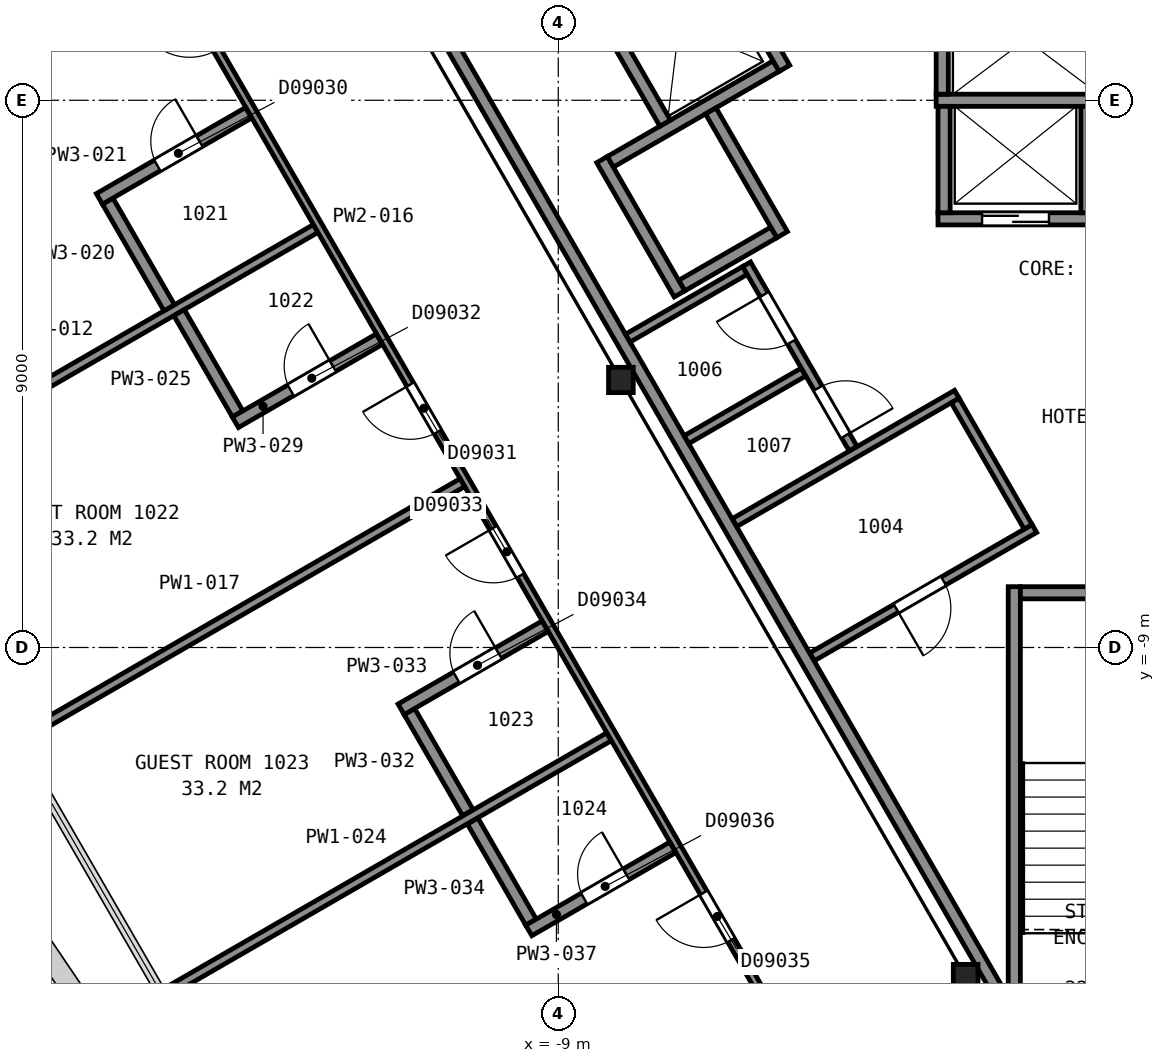
"""IFC4 building model, lengths in metres.
Left out: names, types, materials, properties, quantities, classifications, styles, units other than length and angle.
Written with IfcOpenShell. Run it as: python <this file> out.ifc"""

import sys

from ifc_helpers import new_model, si_unit, direction, frame, frame_2d, origin, origin_2d, place, context, subcontext, project, spatial, rectangle, i_section, extrude, element, fill, save


model = new_model("IFC4")
c1 = context("Model", 3, precision=1e-05, world=origin(), true_north=direction((0.0, 1.0)))
c2 = subcontext(c1, "Body", "Model", "MODEL_VIEW")
j1 = project(units=[si_unit("LENGTHUNIT", "METRE"), si_unit("PLANEANGLEUNIT", "RADIAN")], contexts=[c1])
p1 = place(None, origin())
s1 = spatial("IfcSite", under=j1, at=p1, CompositionType="ELEMENT")
p2 = place(p1, origin())
s2 = spatial("IfcBuilding", under=s1, at=p2, CompositionType="ELEMENT")
p3 = place(p2, frame((0.0, 0.0, 51.2)))
s3 = spatial("IfcBuildingStorey", under=s2, at=p3, CompositionType="ELEMENT", Elevation=51.2)
for number, where, z_axis, x_axis in (
    (1, (-7.97, -4.6, 0.0), (0.0, 0.0, 1.0), (1.0, 0.0, 0.0)),
    (2, (-2.3, -14.42, 0.0), (0.0, 0.0, 1.0), (1.0, 0.0, 0.0)),
):
    element("IfcColumn", number, at=place(p3, frame(where, z_axis=z_axis, x_axis=x_axis)), inside=s3, PredefinedType="COLUMN", context=c2, shape_type="SweptSolid", body=[
        extrude(i_section(OverallWidth=0.406, OverallDepth=0.417, WebThickness=0.03, FlangeThickness=0.048, FilletRadius=0.015, at=origin_2d()), origin(), (0.0, 0.0, 1.0), 3.6),
    ])
p4 = place(p3, frame((-1.5, -8.0, 0.0), z_axis=(0.0, 0.0, 1.0), x_axis=(0.0, -1.0, 0.0)))
e3 = element("IfcWall", 3, at=p4, inside=s3, PredefinedType="PARTITIONING", context=c2, shape_type="SweptSolid", body=[
    extrude(rectangle(XDim=12.0, YDim=0.2, at=frame_2d((6.0, 0.0))), origin(), (0.0, 0.0, 1.0), 3.35),
])
p5 = place(p3, frame((-1.4, -8.1, 0.0), z_axis=(0.0, 0.0, 1.0), x_axis=(1.0, 0.0, 0.0)))
e4 = element("IfcWall", 4, at=p5, inside=s3, PredefinedType="PARTITIONING", context=c2, shape_type="SweptSolid", body=[
    extrude(rectangle(XDim=2.8, YDim=0.2, at=frame_2d((1.4, 0.0))), origin(), (0.0, 0.0, 1.0), 3.35),
])
p6 = place(p3, frame((-2.755, -1.95, 0.0), z_axis=(0.0, 0.0, 1.0), x_axis=(1.0, 0.0, 0.0)))
e5 = element("IfcWall", 5, at=p6, inside=s3, PredefinedType="PARTITIONING", context=c2, shape_type="SweptSolid", body=[
    extrude(rectangle(XDim=2.55, YDim=0.2, at=frame_2d((1.275, 0.0))), origin(), (0.0, 0.0, 1.0), 3.6),
])
p7 = place(p6, frame((0.725, 0.0, 0.0)))
e6 = element("IfcOpeningElement", 6, at=p7, cuts=e5, PredefinedType="OPENING", context=c2, shape_type="SweptSolid", body=[
    extrude(rectangle(XDim=1.1, YDim=2.1, at=frame_2d((0.55, 1.05))), frame((0.0, 0.11, 0.0), z_axis=(0.0, -1.0, 0.0), x_axis=(1.0, 0.0, 0.0)), (0.0, 0.0, 1.0), 0.22),
])
p8 = place(p3, frame((-2.785, 0.0, 0.0), z_axis=(0.0, 0.0, 1.0), x_axis=(1.0, 0.0, 0.0)))
e7 = element("IfcWall", 7, at=p8, inside=s3, PredefinedType="PARTITIONING", context=c2, shape_type="SweptSolid", body=[
    extrude(rectangle(XDim=2.95, YDim=0.2, at=frame_2d((1.475, 0.0))), origin(), (0.0, 0.0, 1.0), 3.6),
])
p9 = place(p3, frame((-6.97, -3.048, 0.0), z_axis=(0.0, 0.0, 1.0), x_axis=(0.866036909293, 0.499980071345, 0.0)))
e8 = element("IfcWall", 8, at=p9, inside=s3, PredefinedType="PARTITIONING", context=c2, shape_type="SweptSolid", body=[
    extrude(rectangle(XDim=1.75, YDim=0.2, at=frame_2d((0.875, 0.0))), origin(), (0.0, 0.0, 1.0), 3.6),
])
p10 = place(p3, frame((-8.145, -1.013, 0.0), z_axis=(0.0, 0.0, 1.0), x_axis=(0.866016494683, 0.500015430699, 0.0)))
e9 = element("IfcWall", 9, at=p10, inside=s3, PredefinedType="PARTITIONING", context=c2, shape_type="SweptSolid", body=[
    extrude(rectangle(XDim=3.15, YDim=0.2, at=frame_2d((1.575, 0.0))), origin(), (0.0, 0.0, 1.0), 3.6),
])
for number, where, z_axis, x_axis in (
    (10, (-0.305, -1.85, 0.0), (0.0, 0.0, 1.0), (0.0, 1.0, 0.0)),
    (11, (-2.655, -1.85, 0.0), (0.0, 0.0, 1.0), (0.0, 1.0, 0.0)),
):
    element("IfcWall", number, at=place(p3, frame(where, z_axis=z_axis, x_axis=x_axis)), inside=s3, PredefinedType="PARTITIONING", context=c2, shape_type="SweptSolid", body=[
        extrude(rectangle(XDim=1.75, YDim=0.2, at=frame_2d((0.875, 0.0))), origin(), (0.0, 0.0, 1.0), 3.6),
    ])
p11 = place(p3, frame((-2.685, 0.1, 0.0), z_axis=(0.0, 0.0, 1.0), x_axis=(0.0, 1.0, 0.0)))
e12 = element("IfcWall", 12, at=p11, inside=s3, PredefinedType="PARTITIONING", context=c2, shape_type="SweptSolid", body=[
    extrude(rectangle(XDim=1.95, YDim=0.2, at=frame_2d((0.975, 0.0))), origin(), (0.0, 0.0, 1.0), 3.6),
])
p12 = place(p3, frame((-5.28, 0.525, 0.0), z_axis=(0.0, 0.0, 1.0), x_axis=(-0.500037662692, 0.866003658127, 0.0)))
e13 = element("IfcWall", 13, at=p12, inside=s3, PredefinedType="PARTITIONING", context=c2, shape_type="SweptSolid", body=[
    extrude(rectangle(XDim=2.95, YDim=0.2, at=frame_2d((1.475, 0.0))), origin(), (0.0, 0.0, 1.0), 3.6),
])
p13 = place(p12, frame((0.925, 0.0, 0.0)))
e14 = element("IfcOpeningElement", 14, at=p13, cuts=e13, PredefinedType="OPENING", context=c2, shape_type="SweptSolid", body=[
    extrude(rectangle(XDim=1.1, YDim=2.1, at=frame_2d((0.55, 1.05))), frame((0.0, 0.11, 0.0), z_axis=(0.0, -1.0, 0.0), x_axis=(1.0, 0.0, 0.0)), (0.0, 0.0, 1.0), 0.22),
])
p14 = place(p3, frame((-5.318, -2.21, 0.0), z_axis=(0.0, 0.0, 1.0), x_axis=(-0.499938297808, 0.866061024631, 0.0)))
e15 = element("IfcWall", 15, at=p14, inside=s3, PredefinedType="PARTITIONING", context=c2, shape_type="SweptSolid", body=[
    extrude(rectangle(XDim=2.35, YDim=0.2, at=frame_2d((1.175, 0.0))), origin(), (0.0, 0.0, 1.0), 3.6),
])
p15 = place(p3, frame((-7.242, -0.376, 0.0), z_axis=(0.0, 0.0, 1.0), x_axis=(-0.499996545922, 0.866027397988, 0.0)))
e16 = element("IfcWall", 16, at=p15, inside=s3, PredefinedType="PARTITIONING", context=c2, shape_type="SweptSolid", body=[
    extrude(rectangle(XDim=2.75, YDim=0.2, at=frame_2d((1.375, 0.0))), origin(), (0.0, 0.0, 1.0), 3.6),
])
p16 = place(p3, frame((-7.006, -3.185, 0.0), z_axis=(0.0, 0.0, 1.0), x_axis=(-0.499990435942, 0.866030925526, 0.0)))
e17 = element("IfcWall", 17, at=p16, inside=s3, PredefinedType="PARTITIONING", context=c2, shape_type="SweptSolid", body=[
    extrude(rectangle(XDim=2.55, YDim=0.2, at=frame_2d((1.275, 0.0))), origin(), (0.0, 0.0, 1.0), 3.6),
])
p17 = place(p3, frame((-13.664, 5.946, 0.0), z_axis=(0.0, 0.0, 1.0), x_axis=(0.499994327219, -0.866028678941, 0.0)))
e18 = element("IfcWall", 18, at=p17, inside=s3, PredefinedType="PARTITIONING", context=c2, shape_type="SweptSolid", body=[
    extrude(rectangle(XDim=23.968, YDim=0.2, at=frame_2d((11.984, 0.0))), origin(), (0.0, 0.0, 1.0), 3.35),
])
p18 = place(p3, frame((-7.856, -3.912, 0.0), z_axis=(0.0, 0.0, 1.0), x_axis=(0.865971748, 0.500092923031, 0.0)))
e19 = element("IfcWall", 19, at=p18, inside=s3, PredefinedType="PARTITIONING", context=c2, shape_type="SweptSolid", body=[
    extrude(rectangle(XDim=2.225, YDim=0.15, at=frame_2d((1.112, 0.0))), origin(), (0.0, 0.0, 1.0), 3.35),
])
p19 = place(p3, frame((-6.892, -5.582, 0.0), z_axis=(0.0, 0.0, 1.0), x_axis=(0.865944298464, 0.500140452231, 0.0)))
e20 = element("IfcWall", 20, at=p19, inside=s3, PredefinedType="PARTITIONING", context=c2, shape_type="SweptSolid", body=[
    extrude(rectangle(XDim=2.224, YDim=0.15, at=frame_2d((1.112, 0.0))), origin(), (0.0, 0.0, 1.0), 3.35),
])
p20 = place(p3, frame((-6.1, -6.946, 0.0), z_axis=(0.0, 0.0, 1.0), x_axis=(0.866038200431, 0.499977834903, 0.0)))
e21 = element("IfcWall", 21, at=p20, inside=s3, PredefinedType="PARTITIONING", context=c2, shape_type="SweptSolid", body=[
    extrude(rectangle(XDim=4.22, YDim=0.15, at=frame_2d((2.11, 0.0))), origin(), (0.0, 0.0, 1.0), 3.35),
])
p21 = place(p3, frame((-4.152, -5.729, 0.0), z_axis=(0.0, 0.0, 1.0), x_axis=(-0.500024287448, 0.866011380966, 0.0)))
e22 = element("IfcWall", 22, at=p21, inside=s3, PredefinedType="PARTITIONING", context=c2, shape_type="SweptSolid", body=[
    extrude(rectangle(XDim=3.501, YDim=0.15, at=frame_2d((1.75, 0.0))), origin(), (0.0, 0.0, 1.0), 3.35),
])
p22 = place(p21, frame((2.026, 0.0, 0.0)))
e23 = element("IfcOpeningElement", 23, at=p22, cuts=e22, PredefinedType="OPENING", context=c2, shape_type="SweptSolid", body=[
    extrude(rectangle(XDim=0.9, YDim=2.1, at=frame_2d((0.45, 1.05))), frame((0.0, 0.085, 0.0), z_axis=(0.0, -1.0, 0.0), x_axis=(1.0, 0.0, 0.0)), (0.0, 0.0, 1.0), 0.17),
])
p23 = place(p21, frame((0.248, 0.0, 0.0)))
e24 = element("IfcOpeningElement", 24, at=p23, cuts=e22, PredefinedType="OPENING", context=c2, shape_type="SweptSolid", body=[
    extrude(rectangle(XDim=0.9, YDim=2.1, at=frame_2d((0.45, 1.05))), frame((0.0, 0.085, 0.0), z_axis=(0.0, -1.0, 0.0), x_axis=(1.0, 0.0, 0.0)), (0.0, 0.0, 1.0), 0.17),
])
p24 = place(p3, frame((-4.825, -9.154, 0.0), z_axis=(0.0, 0.0, 1.0), x_axis=(0.866023738697, 0.500002884005, 0.0)))
e25 = element("IfcWall", 25, at=p24, inside=s3, PredefinedType="PARTITIONING", context=c2, shape_type="SweptSolid", body=[
    extrude(rectangle(XDim=4.22, YDim=0.15, at=frame_2d((2.11, 0.0))), origin(), (0.0, 0.0, 1.0), 3.35),
])
p25 = place(p24, frame((1.595, 0.0, 0.0)))
e26 = element("IfcOpeningElement", 26, at=p25, cuts=e25, PredefinedType="OPENING", context=c2, shape_type="SweptSolid", body=[
    extrude(rectangle(XDim=0.9, YDim=2.1, at=frame_2d((0.45, 1.05))), frame((0.0, 0.085, 0.0), z_axis=(0.0, -1.0, 0.0), x_axis=(1.0, 0.0, 0.0)), (0.0, 0.0, 1.0), 0.17),
])
p26 = place(p3, frame((-2.472, -4.938, 0.0), z_axis=(0.0, 0.0, 1.0), x_axis=(0.500045362686, -0.865999212041, 0.0)))
e27 = element("IfcWall", 27, at=p26, inside=s3, PredefinedType="PARTITIONING", context=c2, shape_type="SweptSolid", body=[
    extrude(rectangle(XDim=2.4, YDim=0.15, at=frame_2d((1.2, 0.0))), origin(), (0.0, 0.0, 1.0), 3.35),
])
p27 = place(p3, frame((-22.984, -1.581, 0.0), z_axis=(0.0, 0.0, 1.0), x_axis=(0.866040157966, 0.499974444137, 0.0)))
e28 = element("IfcWall", 28, at=p27, inside=s3, PredefinedType="PARTITIONING", context=c2, shape_type="SweptSolid", body=[
    extrude(rectangle(XDim=8.387, YDim=0.15, at=frame_2d((4.193, 0.0))), origin(), (0.0, 0.0, 1.0), 2.613),
])
p28 = place(p3, frame((-20.256, -6.305, 0.0), z_axis=(0.0, 0.0, 1.0), x_axis=(0.866037818403, 0.499978496633, 0.0)))
e29 = element("IfcWall", 29, at=p28, inside=s3, PredefinedType="PARTITIONING", context=c2, shape_type="SweptSolid", body=[
    extrude(rectangle(XDim=8.391, YDim=0.15, at=frame_2d((4.196, 0.0))), origin(), (0.0, 0.0, 1.0), 2.613),
])
p29 = place(p3, frame((-3.766, -17.959, 0.0), z_axis=(0.0, 0.0, 1.0), x_axis=(-0.500002884005, 0.866023738697, 0.0)))
e30 = element("IfcWall", 30, at=p29, inside=s3, PredefinedType="PARTITIONING", context=c2, shape_type="SweptSolid", body=[
    extrude(rectangle(XDim=28.135, YDim=0.125, at=frame_2d((14.067, 0.0))), origin(), (0.0, 0.0, 1.0), 2.613),
])
p30 = place(p29, frame((25.422, 0.0, 0.0)))
e31 = element("IfcOpeningElement", 31, at=p30, cuts=e30, PredefinedType="OPENING", context=c2, shape_type="SweptSolid", body=[
    extrude(rectangle(XDim=1.0, YDim=2.1, at=frame_2d((0.5, 1.05))), frame((0.0, 0.073, 0.0), z_axis=(0.0, -1.0, 0.0), x_axis=(1.0, 0.0, 0.0)), (0.0, 0.0, 1.0), 0.145),
])
p31 = place(p29, frame((21.693, 0.0, 0.0)))
e32 = element("IfcOpeningElement", 32, at=p31, cuts=e30, PredefinedType="OPENING", context=c2, shape_type="SweptSolid", body=[
    extrude(rectangle(XDim=0.9, YDim=2.1, at=frame_2d((0.45, 1.05))), frame((0.0, 0.073, 0.0), z_axis=(0.0, -1.0, 0.0), x_axis=(1.0, 0.0, 0.0)), (0.0, 0.0, 1.0), 0.145),
])
p32 = place(p29, frame((14.438, 0.0, 0.0)))
e33 = element("IfcOpeningElement", 33, at=p32, cuts=e30, PredefinedType="OPENING", context=c2, shape_type="SweptSolid", body=[
    extrude(rectangle(XDim=0.9, YDim=2.1, at=frame_2d((0.45, 1.05))), frame((0.0, 0.073, 0.0), z_axis=(0.0, -1.0, 0.0), x_axis=(1.0, 0.0, 0.0)), (0.0, 0.0, 1.0), 0.145),
])
p33 = place(p29, frame((11.712, 0.0, 0.0)))
e34 = element("IfcOpeningElement", 34, at=p33, cuts=e30, PredefinedType="OPENING", context=c2, shape_type="SweptSolid", body=[
    extrude(rectangle(XDim=0.9, YDim=2.1, at=frame_2d((0.45, 1.05))), frame((0.0, 0.073, 0.0), z_axis=(0.0, -1.0, 0.0), x_axis=(1.0, 0.0, 0.0)), (0.0, 0.0, 1.0), 0.145),
])
p34 = place(p29, frame((4.787, 0.0, 0.0)))
e35 = element("IfcOpeningElement", 35, at=p34, cuts=e30, PredefinedType="OPENING", context=c2, shape_type="SweptSolid", body=[
    extrude(rectangle(XDim=0.9, YDim=2.1, at=frame_2d((0.45, 1.05))), frame((0.0, 0.073, 0.0), z_axis=(0.0, -1.0, 0.0), x_axis=(1.0, 0.0, 0.0)), (0.0, 0.0, 1.0), 0.145),
])
p35 = place(p29, frame((1.762, 0.0, 0.0)))
e36 = element("IfcOpeningElement", 36, at=p35, cuts=e30, PredefinedType="OPENING", context=c2, shape_type="SweptSolid", body=[
    extrude(rectangle(XDim=0.9, YDim=2.1, at=frame_2d((0.45, 1.05))), frame((0.0, 0.073, 0.0), z_axis=(0.0, -1.0, 0.0), x_axis=(1.0, 0.0, 0.0)), (0.0, 0.0, 1.0), 0.145),
])
p36 = place(p3, frame((-17.844, -10.484, 0.0), z_axis=(0.0, 0.0, 1.0), x_axis=(0.866037818403, 0.499978496633, 0.0)))
e37 = element("IfcWall", 37, at=p36, inside=s3, PredefinedType="PARTITIONING", context=c2, shape_type="SweptSolid", body=[
    extrude(rectangle(XDim=8.391, YDim=0.15, at=frame_2d((4.196, 0.0))), origin(), (0.0, 0.0, 1.0), 2.613),
])
p37 = place(p3, frame((-16.41, -1.659, 0.0), z_axis=(0.0, 0.0, 1.0), x_axis=(0.49983374806, -0.866121368112, 0.0)))
e38 = element("IfcWall", 38, at=p37, inside=s3, PredefinedType="PARTITIONING", context=c2, shape_type="SweptSolid", body=[
    extrude(rectangle(XDim=2.026, YDim=0.2, at=frame_2d((1.013, 0.0))), origin(), (0.0, 0.0, 1.0), 2.613),
])
p38 = place(p3, frame((-14.094, -0.206, 0.0), z_axis=(0.0, 0.0, 1.0), x_axis=(-0.866033446572, -0.499986069224, 0.0)))
e39 = element("IfcWall", 39, at=p38, inside=s3, PredefinedType="PARTITIONING", context=c2, shape_type="SweptSolid", body=[
    extrude(rectangle(XDim=2.833, YDim=0.2, at=frame_2d((1.416, 0.0))), origin(), (0.0, 0.0, 1.0), 2.613),
])
p39 = place(p38, frame((0.933, 0.0, 0.0)))
e40 = element("IfcOpeningElement", 40, at=p39, cuts=e39, PredefinedType="OPENING", context=c2, shape_type="SweptSolid", body=[
    extrude(rectangle(XDim=0.8, YDim=2.1, at=frame_2d((0.4, 1.05))), frame((0.0, 0.11, 0.0), z_axis=(0.0, -1.0, 0.0), x_axis=(1.0, 0.0, 0.0)), (0.0, 0.0, 1.0), 0.22),
])
p40 = place(p3, frame((-15.431, -14.663, 0.0), z_axis=(0.0, 0.0, 1.0), x_axis=(0.866027553047, 0.499996277349, 0.0)))
e41 = element("IfcWall", 41, at=p40, inside=s3, PredefinedType="PARTITIONING", context=c2, shape_type="SweptSolid", body=[
    extrude(rectangle(XDim=8.387, YDim=0.15, at=frame_2d((4.193, 0.0))), origin(), (0.0, 0.0, 1.0), 2.613),
])
p41 = place(p3, frame((-15.236, -3.493, 0.0), z_axis=(0.0, 0.0, 1.0), x_axis=(0.500190942922, -0.865915134767, 0.0)))
e42 = element("IfcWall", 42, at=p41, inside=s3, PredefinedType="PARTITIONING", context=c2, shape_type="SweptSolid", body=[
    extrude(rectangle(XDim=1.925, YDim=0.2, at=frame_2d((0.962, 0.0))), origin(), (0.0, 0.0, 1.0), 2.613),
])
p42 = place(p3, frame((-14.31, -5.296, 0.0), z_axis=(0.0, 0.0, 1.0), x_axis=(0.866012976267, 0.500021524473, 0.0)))
e43 = element("IfcWall", 43, at=p42, inside=s3, PredefinedType="PARTITIONING", context=c2, shape_type="SweptSolid", body=[
    extrude(rectangle(XDim=2.732, YDim=0.2, at=frame_2d((1.366, 0.0))), origin(), (0.0, 0.0, 1.0), 2.613),
])
p43 = place(p42, frame((1.05, 0.0, 0.0)))
e44 = element("IfcOpeningElement", 44, at=p43, cuts=e43, PredefinedType="OPENING", context=c2, shape_type="SweptSolid", body=[
    extrude(rectangle(XDim=0.8, YDim=2.1, at=frame_2d((0.4, 1.05))), frame((0.0, 0.11, 0.0), z_axis=(0.0, -1.0, 0.0), x_axis=(1.0, 0.0, 0.0)), (0.0, 0.0, 1.0), 0.22),
])
p44 = place(p3, frame((-11.448, -10.053, 0.0), z_axis=(0.0, 0.0, 1.0), x_axis=(0.500214044309, -0.865901789971, 0.0)))
e45 = element("IfcWall", 45, at=p44, inside=s3, PredefinedType="PARTITIONING", context=c2, shape_type="SweptSolid", body=[
    extrude(rectangle(XDim=1.92, YDim=0.2, at=frame_2d((0.96, 0.0))), origin(), (0.0, 0.0, 1.0), 2.613),
])
p45 = place(p3, frame((-9.218, -8.651, 0.0), z_axis=(0.0, 0.0, 1.0), x_axis=(-0.866063622699, -0.499933797055, 0.0)))
e46 = element("IfcWall", 46, at=p45, inside=s3, PredefinedType="PARTITIONING", context=c2, shape_type="SweptSolid", body=[
    extrude(rectangle(XDim=2.733, YDim=0.2, at=frame_2d((1.367, 0.0))), origin(), (0.0, 0.0, 1.0), 2.613),
])
p46 = place(p45, frame((0.883, 0.0, 0.0)))
e47 = element("IfcOpeningElement", 47, at=p46, cuts=e46, PredefinedType="OPENING", context=c2, shape_type="SweptSolid", body=[
    extrude(rectangle(XDim=0.8, YDim=2.1, at=frame_2d((0.4, 1.05))), frame((0.0, 0.11, 0.0), z_axis=(0.0, -1.0, 0.0), x_axis=(1.0, 0.0, 0.0)), (0.0, 0.0, 1.0), 0.22),
])
p47 = place(p3, frame((-10.407, -11.855, 0.0), z_axis=(0.0, 0.0, 1.0), x_axis=(0.499887618105, -0.86609027778, 0.0)))
e48 = element("IfcWall", 48, at=p47, inside=s3, PredefinedType="PARTITIONING", context=c2, shape_type="SweptSolid", body=[
    extrude(rectangle(XDim=1.919, YDim=0.2, at=frame_2d((0.96, 0.0))), origin(), (0.0, 0.0, 1.0), 2.613),
])
p48 = place(p3, frame((-9.485, -13.654, 0.0), z_axis=(0.0, 0.0, 1.0), x_axis=(0.866102295869, 0.499866795347, 0.0)))
e49 = element("IfcWall", 49, at=p48, inside=s3, PredefinedType="PARTITIONING", context=c2, shape_type="SweptSolid", body=[
    extrude(rectangle(XDim=2.733, YDim=0.2, at=frame_2d((1.367, 0.0))), origin(), (0.0, 0.0, 1.0), 2.613),
])
p49 = place(p48, frame((1.05, 0.0, 0.0)))
e50 = element("IfcOpeningElement", 50, at=p49, cuts=e49, PredefinedType="OPENING", context=c2, shape_type="SweptSolid", body=[
    extrude(rectangle(XDim=0.8, YDim=2.1, at=frame_2d((0.4, 1.05))), frame((0.0, 0.11, 0.0), z_axis=(0.0, -1.0, 0.0), x_axis=(1.0, 0.0, 0.0)), (0.0, 0.0, 1.0), 0.22),
])
p50 = place(p7, origin())
e51 = element("IfcDoor", 51, at=p50, inside=s3, OperationType="SLIDING_TO_RIGHT", PredefinedType="DOOR", context=c2, shape_type="SweptSolid", body=[
    extrude(rectangle(XDim=1.1, YDim=2.1, at=frame_2d((0.55, 1.05))), frame((0.0, 0.025, 0.0), z_axis=(0.0, -1.0, 0.0), x_axis=(1.0, 0.0, 0.0)), (0.0, 0.0, 1.0), 0.05),
])
fill(e6, e51)
p51 = place(p22, origin())
e52 = element("IfcDoor", 52, at=p51, inside=s3, OperationType="SINGLE_SWING_RIGHT", PredefinedType="DOOR", context=c2, shape_type="SweptSolid", body=[
    extrude(rectangle(XDim=0.9, YDim=2.1, at=frame_2d((0.45, 1.05))), frame((0.0, 0.025, 0.0), z_axis=(0.0, -1.0, 0.0), x_axis=(1.0, 0.0, 0.0)), (0.0, 0.0, 1.0), 0.05),
])
fill(e23, e52)
p52 = place(p23, origin())
e53 = element("IfcDoor", 53, at=p52, inside=s3, OperationType="SINGLE_SWING_LEFT", PredefinedType="DOOR", context=c2, shape_type="SweptSolid", body=[
    extrude(rectangle(XDim=0.9, YDim=2.1, at=frame_2d((0.45, 1.05))), frame((0.0, 0.025, 0.0), z_axis=(0.0, -1.0, 0.0), x_axis=(1.0, 0.0, 0.0)), (0.0, 0.0, 1.0), 0.05),
])
fill(e24, e53)
p53 = place(p25, origin())
e54 = element("IfcDoor", 54, at=p53, inside=s3, OperationType="SINGLE_SWING_LEFT", PredefinedType="DOOR", context=c2, shape_type="SweptSolid", body=[
    extrude(rectangle(XDim=0.9, YDim=2.1, at=frame_2d((0.45, 1.05))), frame((0.0, 0.025, 0.0), z_axis=(0.0, -1.0, 0.0), x_axis=(1.0, 0.0, 0.0)), (0.0, 0.0, 1.0), 0.05),
])
fill(e26, e54)
p54 = place(p32, origin())
e55 = element("IfcDoor", 55, at=p54, inside=s3, OperationType="SINGLE_SWING_RIGHT", PredefinedType="DOOR", context=c2, shape_type="SweptSolid", body=[
    extrude(rectangle(XDim=0.9, YDim=2.1, at=frame_2d((0.45, 1.05))), frame((0.0, 0.025, 0.0), z_axis=(0.0, -1.0, 0.0), x_axis=(1.0, 0.0, 0.0)), (0.0, 0.0, 1.0), 0.05),
])
fill(e33, e55)
p55 = place(p33, origin())
e56 = element("IfcDoor", 56, at=p55, inside=s3, OperationType="SINGLE_SWING_RIGHT", PredefinedType="DOOR", context=c2, shape_type="SweptSolid", body=[
    extrude(rectangle(XDim=0.9, YDim=2.1, at=frame_2d((0.45, 1.05))), frame((0.0, 0.025, 0.0), z_axis=(0.0, -1.0, 0.0), x_axis=(1.0, 0.0, 0.0)), (0.0, 0.0, 1.0), 0.05),
])
fill(e34, e56)
p56 = place(p34, origin())
e57 = element("IfcDoor", 57, at=p56, inside=s3, OperationType="SINGLE_SWING_RIGHT", PredefinedType="DOOR", context=c2, shape_type="SweptSolid", body=[
    extrude(rectangle(XDim=0.9, YDim=2.1, at=frame_2d((0.45, 1.05))), frame((0.0, 0.025, 0.0), z_axis=(0.0, -1.0, 0.0), x_axis=(1.0, 0.0, 0.0)), (0.0, 0.0, 1.0), 0.05),
])
fill(e35, e57)
p57 = place(p39, origin())
e58 = element("IfcDoor", 58, at=p57, inside=s3, OperationType="SINGLE_SWING_LEFT", PredefinedType="DOOR", context=c2, shape_type="SweptSolid", body=[
    extrude(rectangle(XDim=0.8, YDim=2.1, at=frame_2d((0.4, 1.05))), frame((0.0, 0.025, 0.0), z_axis=(0.0, -1.0, 0.0), x_axis=(1.0, 0.0, 0.0)), (0.0, 0.0, 1.0), 0.05),
])
fill(e40, e58)
p58 = place(p43, origin())
e59 = element("IfcDoor", 59, at=p58, inside=s3, OperationType="SINGLE_SWING_RIGHT", PredefinedType="DOOR", context=c2, shape_type="SweptSolid", body=[
    extrude(rectangle(XDim=0.8, YDim=2.1, at=frame_2d((0.4, 1.05))), frame((0.0, 0.025, 0.0), z_axis=(0.0, -1.0, 0.0), x_axis=(1.0, 0.0, 0.0)), (0.0, 0.0, 1.0), 0.05),
])
fill(e44, e59)
p59 = place(p46, origin())
e60 = element("IfcDoor", 60, at=p59, inside=s3, OperationType="SINGLE_SWING_LEFT", PredefinedType="DOOR", context=c2, shape_type="SweptSolid", body=[
    extrude(rectangle(XDim=0.8, YDim=2.1, at=frame_2d((0.4, 1.05))), frame((0.0, 0.025, 0.0), z_axis=(0.0, -1.0, 0.0), x_axis=(1.0, 0.0, 0.0)), (0.0, 0.0, 1.0), 0.05),
])
fill(e47, e60)
p60 = place(p49, origin())
e61 = element("IfcDoor", 61, at=p60, inside=s3, OperationType="SINGLE_SWING_RIGHT", PredefinedType="DOOR", context=c2, shape_type="SweptSolid", body=[
    extrude(rectangle(XDim=0.8, YDim=2.1, at=frame_2d((0.4, 1.05))), frame((0.0, 0.025, 0.0), z_axis=(0.0, -1.0, 0.0), x_axis=(1.0, 0.0, 0.0)), (0.0, 0.0, 1.0), 0.05),
])
fill(e50, e61)
save(model, sys.argv[1])
